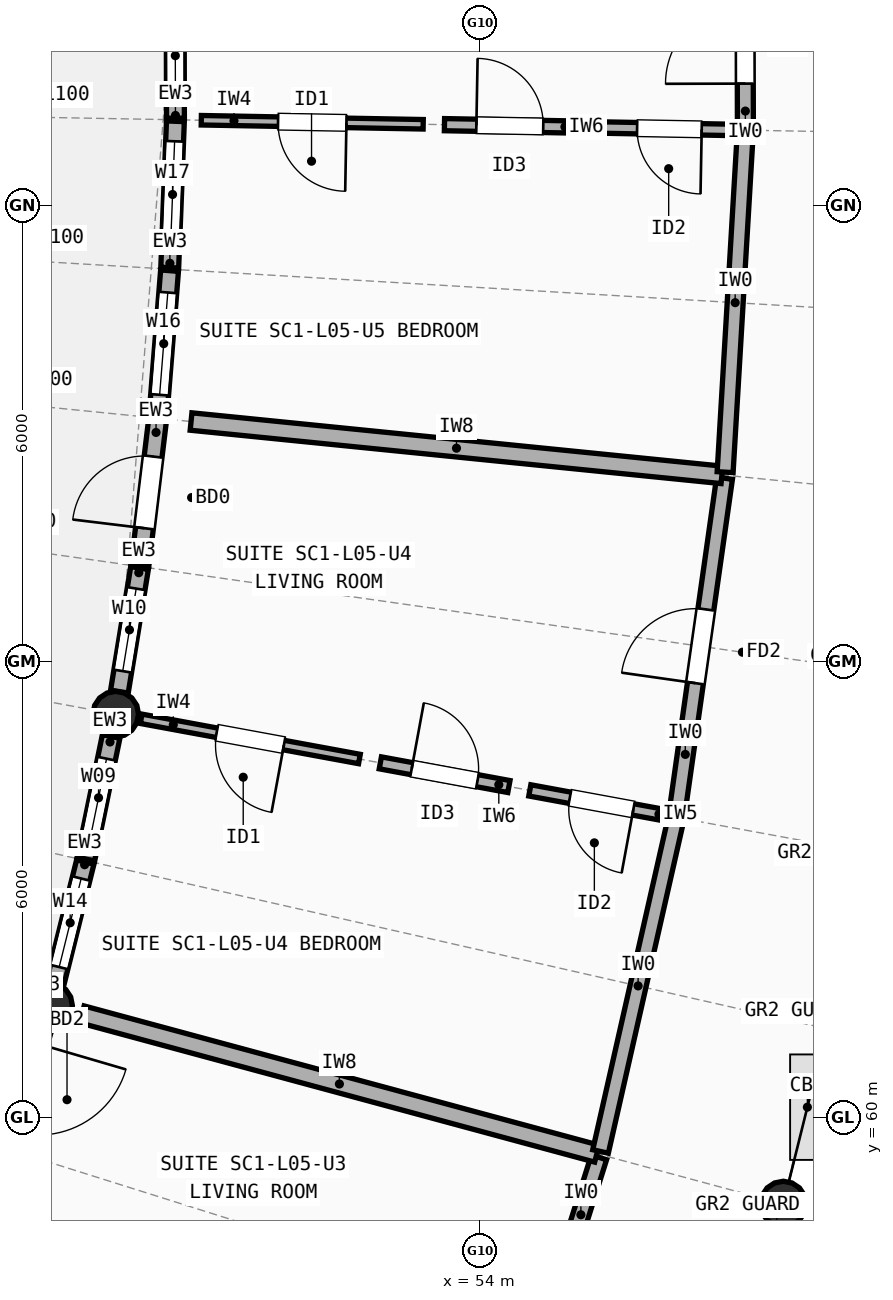
"""IFC4 building model, lengths in metres.
Left out: names, types, materials, properties, quantities, classifications, styles, units other than length and angle.
Written with IfcOpenShell. Run it as: python <this file> out.ifc"""

import sys

from ifc_helpers import new_model, si_unit, direction, frame, frame_2d, origin, origin_2d, place, context, subcontext, project, spatial, rectangle, circle, extrude, element, fill, save


model = new_model("IFC4")
c1 = context("Model", 3, precision=1e-05, world=origin(), true_north=direction((0.0, 1.0)))
c2 = subcontext(c1, "Body", "Model", "MODEL_VIEW")
j1 = project(units=[si_unit("LENGTHUNIT", "METRE"), si_unit("PLANEANGLEUNIT", "RADIAN")], contexts=[c1])
p1 = place(None, origin())
s1 = spatial("IfcSite", under=j1, at=p1, CompositionType="ELEMENT")
p2 = place(p1, origin())
s2 = spatial("IfcBuilding", under=s1, at=p2, CompositionType="ELEMENT")
p3 = place(p2, frame((0.0, 0.0, 17.3)))
s3 = spatial("IfcBuildingStorey", under=s2, at=p3, CompositionType="ELEMENT", Elevation=17.3)
for number, where, z_axis, x_axis in (
    (1, (48.336, 61.471, 0.0), (0.0, 0.0, 1.0), (1.0, 0.0, 0.0)),
    (2, (57.99, 58.861, 0.0), (0.0, 0.0, 1.0), (1.0, 0.0, 0.0)),
    (3, (49.206, 65.306, 0.0), (0.0, 0.0, 1.0), (1.0, 0.0, 0.0)),
):
    element("IfcColumn", number, at=place(p3, frame(where, z_axis=z_axis, x_axis=x_axis)), inside=s3, PredefinedType="COLUMN", context=c2, shape_type="SweptSolid", body=[
        extrude(circle(Radius=0.3, at=origin_2d()), origin(), (0.0, 0.0, 1.0), 2.94),
    ])
p4 = place(p3, frame((48.408, 61.762, 0.0), z_axis=(0.0, 0.0, 1.0), x_axis=(0.241175130643, 0.970481610521, 0.0)))
e4 = element("IfcWall", 4, at=p4, inside=s3, PredefinedType="STANDARD", context=c2, shape_type="SweptSolid", body=[
    extrude(rectangle(XDim=1.647, YDim=0.235, at=frame_2d((0.823, 0.0))), origin(), (0.0, 0.0, 1.0), 2.676),
])
p5 = place(p4, frame((0.223, 0.0, 0.85)))
e5 = element("IfcOpeningElement", 5, at=p5, cuts=e4, PredefinedType="OPENING", context=c2, shape_type="SweptSolid", body=[
    extrude(rectangle(XDim=1.2, YDim=1.5, at=frame_2d((0.6, 0.75))), frame((0.0, 0.127, 0.0), z_axis=(0.0, -1.0, 0.0), x_axis=(1.0, 0.0, 0.0)), (0.0, 0.0, 1.0), 0.255),
])
p6 = place(p3, frame((48.814, 63.399, 0.0), z_axis=(0.0, 0.0, 1.0), x_axis=(0.201188555682, 0.97955253308, 0.0)))
e6 = element("IfcWall", 6, at=p6, inside=s3, PredefinedType="STANDARD", context=c2, shape_type="SweptSolid", body=[
    extrude(rectangle(XDim=1.647, YDim=0.235, at=frame_2d((0.823, 0.0))), origin(), (0.0, 0.0, 1.0), 2.676),
])
p7 = place(p6, frame((0.298, 0.0, 0.85)))
e7 = element("IfcOpeningElement", 7, at=p7, cuts=e6, PredefinedType="OPENING", context=c2, shape_type="SweptSolid", body=[
    extrude(rectangle(XDim=1.05, YDim=1.35, at=frame_2d((0.525, 0.675))), frame((0.0, 0.127, 0.0), z_axis=(0.0, -1.0, 0.0), x_axis=(1.0, 0.0, 0.0)), (0.0, 0.0, 1.0), 0.255),
])
p8 = place(p3, frame((49.254, 65.603, 0.0), z_axis=(0.0, 0.0, 1.0), x_axis=(0.161008118798, 0.986953081803, 0.0)))
e8 = element("IfcWall", 8, at=p8, inside=s3, PredefinedType="STANDARD", context=c2, shape_type="SweptSolid", body=[
    extrude(rectangle(XDim=1.647, YDim=0.235, at=frame_2d((0.823, 0.0))), origin(), (0.0, 0.0, 1.0), 2.676),
])
p9 = place(p8, frame((0.273, 0.0, 0.85)))
e9 = element("IfcOpeningElement", 9, at=p9, cuts=e8, PredefinedType="OPENING", context=c2, shape_type="SweptSolid", body=[
    extrude(rectangle(XDim=1.1, YDim=1.45, at=frame_2d((0.55, 0.725))), frame((0.0, 0.127, 0.0), z_axis=(0.0, -1.0, 0.0), x_axis=(1.0, 0.0, 0.0)), (0.0, 0.0, 1.0), 0.255),
])
p10 = place(p3, frame((49.525, 67.268, 0.0), z_axis=(0.0, 0.0, 1.0), x_axis=(0.120384349076, 0.992727358592, 0.0)))
e10 = element("IfcWall", 10, at=p10, inside=s3, PredefinedType="STANDARD", context=c2, shape_type="SweptSolid", body=[
    extrude(rectangle(XDim=1.927, YDim=0.235, at=frame_2d((0.963, 0.0))), origin(), (0.0, 0.0, 1.0), 2.676),
])
p11 = place(p10, frame((0.488, 0.0, 0.0)))
e11 = element("IfcOpeningElement", 11, at=p11, cuts=e10, PredefinedType="OPENING", context=c2, shape_type="SweptSolid", body=[
    extrude(rectangle(XDim=0.95, YDim=2.12, at=frame_2d((0.475, 1.06))), frame((0.0, 0.127, 0.0), z_axis=(0.0, -1.0, 0.0), x_axis=(1.0, 0.0, 0.0)), (0.0, 0.0, 1.0), 0.255),
])
p12 = place(p3, frame((49.761, 69.22, 0.0), z_axis=(0.0, 0.0, 1.0), x_axis=(0.079573991137, 0.996828962227, 0.0)))
e12 = element("IfcWall", 12, at=p12, inside=s3, PredefinedType="STANDARD", context=c2, shape_type="SweptSolid", body=[
    extrude(rectangle(XDim=1.927, YDim=0.235, at=frame_2d((0.963, 0.0))), origin(), (0.0, 0.0, 1.0), 2.94),
])
p13 = place(p12, frame((0.289, 0.0, 0.85)))
e13 = element("IfcOpeningElement", 13, at=p13, cuts=e12, PredefinedType="OPENING", context=c2, shape_type="SweptSolid", body=[
    extrude(rectangle(XDim=1.35, YDim=1.5, at=frame_2d((0.675, 0.75))), frame((0.0, 0.127, 0.0), z_axis=(0.0, -1.0, 0.0), x_axis=(1.0, 0.0, 0.0)), (0.0, 0.0, 1.0), 0.255),
])
p14 = place(p3, frame((49.917, 71.181, 0.0), z_axis=(0.0, 0.0, 1.0), x_axis=(0.038647240614, 0.999252916329, 0.0)))
e14 = element("IfcWall", 14, at=p14, inside=s3, PredefinedType="STANDARD", context=c2, shape_type="SweptSolid", body=[
    extrude(rectangle(XDim=1.927, YDim=0.235, at=frame_2d((0.963, 0.0))), origin(), (0.0, 0.0, 1.0), 2.676),
])
p15 = place(p14, frame((0.263, 0.0, 0.85)))
e15 = element("IfcOpeningElement", 15, at=p15, cuts=e14, PredefinedType="OPENING", context=c2, shape_type="SweptSolid", body=[
    extrude(rectangle(XDim=1.4, YDim=1.5, at=frame_2d((0.7, 0.75))), frame((0.0, 0.127, 0.0), z_axis=(0.0, -1.0, 0.0), x_axis=(1.0, 0.0, 0.0)), (0.0, 0.0, 1.0), 0.255),
])
p16 = place(p3, frame((49.992, 73.146, 0.0), z_axis=(0.0, 0.0, 1.0), x_axis=(-0.002224193787, 0.999997526478, 0.0)))
e16 = element("IfcWall", 16, at=p16, inside=s3, PredefinedType="STANDARD", context=c2, shape_type="SweptSolid", body=[
    extrude(rectangle(XDim=1.646, YDim=0.235, at=frame_2d((0.823, 0.0))), origin(), (0.0, 0.0, 1.0), 2.676),
])
p17 = place(p16, frame((0.223, 0.0, 0.85)))
e17 = element("IfcOpeningElement", 17, at=p17, cuts=e16, PredefinedType="OPENING", context=c2, shape_type="SweptSolid", body=[
    extrude(rectangle(XDim=1.2, YDim=1.45, at=frame_2d((0.6, 0.725))), frame((0.0, 0.127, 0.0), z_axis=(0.0, -1.0, 0.0), x_axis=(1.0, 0.0, 0.0)), (0.0, 0.0, 1.0), 0.255),
])
p18 = place(p3, frame((54.222, 55.215, 0.0), z_axis=(0.0, 0.0, 1.0), x_axis=(0.300377958446, 0.953820256694, 0.0)))
e18 = element("IfcWall", 18, at=p18, inside=s3, PredefinedType="SOLIDWALL", context=c2, shape_type="SweptSolid", body=[
    extrude(rectangle(XDim=4.467, YDim=0.21, at=frame_2d((2.233, 0.0))), origin(), (0.0, 0.0, 1.0), 2.714),
])
p19 = place(p18, frame((1.733, 0.0, 0.0)))
e19 = element("IfcOpeningElement", 19, at=p19, cuts=e18, PredefinedType="OPENING", context=c2, shape_type="SweptSolid", body=[
    extrude(rectangle(XDim=1.0, YDim=2.15, at=frame_2d((0.5, 1.075))), frame((0.0, 0.115, 0.0), z_axis=(0.0, -1.0, 0.0), x_axis=(1.0, 0.0, 0.0)), (0.0, 0.0, 1.0), 0.23),
])
p20 = place(p3, frame((48.761, 61.356, 0.0), z_axis=(0.0, 0.0, 1.0), x_axis=(0.965329768393, -0.26103340448, 0.0)))
e20 = element("IfcWall", 20, at=p20, inside=s3, PredefinedType="SOLIDWALL", context=c2, shape_type="SweptSolid", body=[
    extrude(rectangle(XDim=7.02, YDim=0.23, at=frame_2d((3.51, 0.0))), origin(), (0.0, 0.0, 1.0), 2.734),
])
p21 = place(p3, frame((55.585, 59.552, 0.0), z_axis=(0.0, 0.0, 1.0), x_axis=(0.221221895428, 0.97522349899, 0.0)))
e21 = element("IfcWall", 21, at=p21, inside=s3, PredefinedType="SOLIDWALL", context=c2, shape_type="SweptSolid", body=[
    extrude(rectangle(XDim=4.467, YDim=0.21, at=frame_2d((2.234, 0.0))), origin(), (0.0, 0.0, 1.0), 2.754),
])
p22 = place(p3, frame((56.588, 63.988, 0.0), z_axis=(0.0, 0.0, 1.0), x_axis=(0.140732688284, 0.990047630394, 0.0)))
e22 = element("IfcWall", 22, at=p22, inside=s3, PredefinedType="SOLIDWALL", context=c2, shape_type="SweptSolid", body=[
    extrude(rectangle(XDim=4.467, YDim=0.21, at=frame_2d((2.233, 0.0))), origin(), (0.0, 0.0, 1.0), 2.734),
])
p23 = place(p22, frame((1.744, 0.0, 0.0)))
e23 = element("IfcOpeningElement", 23, at=p23, cuts=e22, PredefinedType="OPENING", context=c2, shape_type="SweptSolid", body=[
    extrude(rectangle(XDim=0.98, YDim=2.15, at=frame_2d((0.49, 1.075))), frame((0.0, 0.115, 0.0), z_axis=(0.0, -1.0, 0.0), x_axis=(1.0, 0.0, 0.0)), (0.0, 0.0, 1.0), 0.23),
])
p24 = place(p3, frame((49.541, 65.245, 0.0), z_axis=(0.0, 0.0, 1.0), x_axis=(0.983451228591, -0.181173069145, 0.0)))
e24 = element("IfcWall", 24, at=p24, inside=s3, PredefinedType="PARTITIONING", context=c2, shape_type="SweptSolid", body=[
    extrude(rectangle(XDim=2.92, YDim=0.125, at=frame_2d((1.46, 0.0))), origin(), (0.0, 0.0, 1.0), 2.714),
])
p25 = place(p24, frame((1.01, 0.0, 0.0)))
e25 = element("IfcOpeningElement", 25, at=p25, cuts=e24, PredefinedType="OPENING", context=c2, shape_type="SweptSolid", body=[
    extrude(rectangle(XDim=0.9, YDim=2.1, at=frame_2d((0.45, 1.05))), frame((0.0, 0.073, 0.0), z_axis=(0.0, -1.0, 0.0), x_axis=(1.0, 0.0, 0.0)), (0.0, 0.0, 1.0), 0.145),
])
p26 = place(p3, frame((52.688, 64.665, 0.0), z_axis=(0.0, 0.0, 1.0), x_axis=(0.983463169084, -0.181108241269, 0.0)))
e26 = element("IfcWall", 26, at=p26, inside=s3, PredefinedType="PLUMBINGWALL", context=c2, shape_type="SweptSolid", body=[
    extrude(rectangle(XDim=1.72, YDim=0.16, at=frame_2d((0.86, 0.0))), origin(), (0.0, 0.0, 1.0), 2.714),
])
p27 = place(p26, frame((0.42, 0.0, 0.0)))
e27 = element("IfcOpeningElement", 27, at=p27, cuts=e26, PredefinedType="OPENING", context=c2, shape_type="SweptSolid", body=[
    extrude(rectangle(XDim=0.88, YDim=2.1, at=frame_2d((0.44, 1.05))), frame((0.0, 0.09, 0.0), z_axis=(0.0, -1.0, 0.0), x_axis=(1.0, 0.0, 0.0)), (0.0, 0.0, 1.0), 0.18),
])
p28 = place(p3, frame((54.655, 64.303, 0.0), z_axis=(0.0, 0.0, 1.0), x_axis=(0.983468686283, -0.181078278933, 0.0)))
e28 = element("IfcWall", 28, at=p28, inside=s3, PredefinedType="PARTITIONING", context=c2, shape_type="SweptSolid", body=[
    extrude(rectangle(XDim=1.92, YDim=0.15, at=frame_2d((0.96, 0.0))), origin(), (0.0, 0.0, 1.0), 2.714),
])
p29 = place(p28, frame((0.535, 0.0, 0.0)))
e29 = element("IfcOpeningElement", 29, at=p29, cuts=e28, PredefinedType="OPENING", context=c2, shape_type="SweptSolid", body=[
    extrude(rectangle(XDim=0.85, YDim=2.1, at=frame_2d((0.425, 1.05))), frame((0.0, 0.085, 0.0), z_axis=(0.0, -1.0, 0.0), x_axis=(1.0, 0.0, 0.0)), (0.0, 0.0, 1.0), 0.17),
])
p30 = place(p3, frame((50.197, 69.156, 0.0), z_axis=(0.0, 0.0, 1.0), x_axis=(0.994988519083, -0.09998923389, 0.0)))
e30 = element("IfcWall", 30, at=p30, inside=s3, PredefinedType="SOLIDWALL", context=c2, shape_type="SweptSolid", body=[
    extrude(rectangle(XDim=7.02, YDim=0.23, at=frame_2d((3.51, 0.0))), origin(), (0.0, 0.0, 1.0), 2.754),
])
p31 = place(p3, frame((57.224, 68.49, 0.0), z_axis=(0.0, 0.0, 1.0), x_axis=(0.059132085895, 0.998250167252, 0.0)))
e31 = element("IfcWall", 31, at=p31, inside=s3, PredefinedType="SOLIDWALL", context=c2, shape_type="SweptSolid", body=[
    extrude(rectangle(XDim=4.467, YDim=0.21, at=frame_2d((2.234, 0.0))), origin(), (0.0, 0.0, 1.0), 2.714),
])
p32 = place(p3, frame((57.491, 73.029, 0.0), z_axis=(0.0, 0.0, 1.0), x_axis=(-0.0023367022, 0.999997269908, 0.0)))
e32 = element("IfcWall", 32, at=p32, inside=s3, PredefinedType="SOLIDWALL", context=c2, shape_type="SweptSolid", body=[
    extrude(rectangle(XDim=2.194, YDim=0.21, at=frame_2d((1.097, 0.0))), origin(), (0.0, 0.0, 1.0), 2.965),
])
p33 = place(p32, frame((0.572, 0.0, 0.0)))
e33 = element("IfcOpeningElement", 33, at=p33, cuts=e32, PredefinedType="OPENING", context=c2, shape_type="SweptSolid", body=[
    extrude(rectangle(XDim=1.05, YDim=2.15, at=frame_2d((0.525, 1.075))), frame((0.0, 0.115, 0.0), z_axis=(0.0, -1.0, 0.0), x_axis=(1.0, 0.0, 0.0)), (0.0, 0.0, 1.0), 0.23),
])
p34 = place(p3, frame((50.332, 73.12, 0.0), z_axis=(0.0, 0.0, 1.0), x_axis=(0.999833866331, -0.018227444628, 0.0)))
e34 = element("IfcWall", 34, at=p34, inside=s3, PredefinedType="PARTITIONING", context=c2, shape_type="SweptSolid", body=[
    extrude(rectangle(XDim=2.92, YDim=0.125, at=frame_2d((1.46, 0.0))), origin(), (0.0, 0.0, 1.0), 2.734),
])
p35 = place(p34, frame((1.01, 0.0, 0.0)))
e35 = element("IfcOpeningElement", 35, at=p35, cuts=e34, PredefinedType="OPENING", context=c2, shape_type="SweptSolid", body=[
    extrude(rectangle(XDim=0.9, YDim=2.1, at=frame_2d((0.45, 1.05))), frame((0.0, 0.073, 0.0), z_axis=(0.0, -1.0, 0.0), x_axis=(1.0, 0.0, 0.0)), (0.0, 0.0, 1.0), 0.145),
])
p36 = place(p3, frame((53.531, 73.062, 0.0), z_axis=(0.0, 0.0, 1.0), x_axis=(0.999832350792, -0.018310388026, 0.0)))
e36 = element("IfcWall", 36, at=p36, inside=s3, PredefinedType="PLUMBINGWALL", context=c2, shape_type="SweptSolid", body=[
    extrude(rectangle(XDim=1.72, YDim=0.16, at=frame_2d((0.86, 0.0))), origin(), (0.0, 0.0, 1.0), 2.734),
])
p37 = place(p36, frame((0.42, 0.0, 0.0)))
e37 = element("IfcOpeningElement", 37, at=p37, cuts=e36, PredefinedType="OPENING", context=c2, shape_type="SweptSolid", body=[
    extrude(rectangle(XDim=0.88, YDim=2.1, at=frame_2d((0.44, 1.05))), frame((0.0, 0.09, 0.0), z_axis=(0.0, -1.0, 0.0), x_axis=(1.0, 0.0, 0.0)), (0.0, 0.0, 1.0), 0.18),
])
p38 = place(p3, frame((55.531, 73.025, 0.0), z_axis=(0.0, 0.0, 1.0), x_axis=(0.99983466766, -0.018183436026, 0.0)))
e38 = element("IfcWall", 38, at=p38, inside=s3, PredefinedType="PARTITIONING", context=c2, shape_type="SweptSolid", body=[
    extrude(rectangle(XDim=1.92, YDim=0.15, at=frame_2d((0.96, 0.0))), origin(), (0.0, 0.0, 1.0), 2.734),
])
p39 = place(p38, frame((0.535, 0.0, 0.0)))
e39 = element("IfcOpeningElement", 39, at=p39, cuts=e38, PredefinedType="OPENING", context=c2, shape_type="SweptSolid", body=[
    extrude(rectangle(XDim=0.85, YDim=2.1, at=frame_2d((0.425, 1.05))), frame((0.0, 0.085, 0.0), z_axis=(0.0, -1.0, 0.0), x_axis=(1.0, 0.0, 0.0)), (0.0, 0.0, 1.0), 0.17),
])
p40 = place(p5, origin())
e40 = element("IfcWindow", 40, at=p40, inside=s3, PartitioningType="SINGLE_PANEL", PredefinedType="WINDOW", context=c2, shape_type="SweptSolid", body=[
    extrude(rectangle(XDim=1.2, YDim=1.5, at=frame_2d((0.6, 0.75))), frame((0.0, 0.03, 0.0), z_axis=(0.0, -1.0, 0.0), x_axis=(1.0, 0.0, 0.0)), (0.0, 0.0, 1.0), 0.06),
])
fill(e5, e40)
p41 = place(p7, origin())
e41 = element("IfcWindow", 41, at=p41, inside=s3, PartitioningType="SINGLE_PANEL", PredefinedType="WINDOW", context=c2, shape_type="SweptSolid", body=[
    extrude(rectangle(XDim=1.05, YDim=1.35, at=frame_2d((0.525, 0.675))), frame((0.0, 0.03, 0.0), z_axis=(0.0, -1.0, 0.0), x_axis=(1.0, 0.0, 0.0)), (0.0, 0.0, 1.0), 0.06),
])
fill(e7, e41)
p42 = place(p9, origin())
e42 = element("IfcWindow", 42, at=p42, inside=s3, PartitioningType="SINGLE_PANEL", PredefinedType="WINDOW", context=c2, shape_type="SweptSolid", body=[
    extrude(rectangle(XDim=1.1, YDim=1.45, at=frame_2d((0.55, 0.725))), frame((0.0, 0.03, 0.0), z_axis=(0.0, -1.0, 0.0), x_axis=(1.0, 0.0, 0.0)), (0.0, 0.0, 1.0), 0.06),
])
fill(e9, e42)
p43 = place(p11, origin())
e43 = element("IfcDoor", 43, at=p43, inside=s3, OperationType="SINGLE_SWING_LEFT", PredefinedType="DOOR", context=c2, shape_type="SweptSolid", body=[
    extrude(rectangle(XDim=0.95, YDim=2.12, at=frame_2d((0.475, 1.06))), frame((0.0, 0.025, 0.0), z_axis=(0.0, -1.0, 0.0), x_axis=(1.0, 0.0, 0.0)), (0.0, 0.0, 1.0), 0.05),
])
fill(e11, e43)
p44 = place(p13, origin())
e44 = element("IfcWindow", 44, at=p44, inside=s3, PartitioningType="SINGLE_PANEL", PredefinedType="WINDOW", context=c2, shape_type="SweptSolid", body=[
    extrude(rectangle(XDim=1.35, YDim=1.5, at=frame_2d((0.675, 0.75))), frame((0.0, 0.03, 0.0), z_axis=(0.0, -1.0, 0.0), x_axis=(1.0, 0.0, 0.0)), (0.0, 0.0, 1.0), 0.06),
])
fill(e13, e44)
p45 = place(p15, origin())
e45 = element("IfcWindow", 45, at=p45, inside=s3, PartitioningType="SINGLE_PANEL", PredefinedType="WINDOW", context=c2, shape_type="SweptSolid", body=[
    extrude(rectangle(XDim=1.4, YDim=1.5, at=frame_2d((0.7, 0.75))), frame((0.0, 0.03, 0.0), z_axis=(0.0, -1.0, 0.0), x_axis=(1.0, 0.0, 0.0)), (0.0, 0.0, 1.0), 0.06),
])
fill(e15, e45)
p46 = place(p17, origin())
e46 = element("IfcWindow", 46, at=p46, inside=s3, PartitioningType="SINGLE_PANEL", PredefinedType="WINDOW", context=c2, shape_type="SweptSolid", body=[
    extrude(rectangle(XDim=1.2, YDim=1.45, at=frame_2d((0.6, 0.725))), frame((0.0, 0.03, 0.0), z_axis=(0.0, -1.0, 0.0), x_axis=(1.0, 0.0, 0.0)), (0.0, 0.0, 1.0), 0.06),
])
fill(e17, e46)
p47 = place(p23, origin())
e47 = element("IfcDoor", 47, at=p47, inside=s3, OperationType="SINGLE_SWING_LEFT", PredefinedType="DOOR", context=c2, shape_type="SweptSolid", body=[
    extrude(rectangle(XDim=0.98, YDim=2.15, at=frame_2d((0.49, 1.075))), frame((0.0, 0.025, 0.0), z_axis=(0.0, -1.0, 0.0), x_axis=(1.0, 0.0, 0.0)), (0.0, 0.0, 1.0), 0.05),
])
fill(e23, e47)
p48 = place(p25, origin())
e48 = element("IfcDoor", 48, at=p48, inside=s3, OperationType="SINGLE_SWING_RIGHT", PredefinedType="DOOR", context=c2, shape_type="SweptSolid", body=[
    extrude(rectangle(XDim=0.9, YDim=2.1, at=frame_2d((0.45, 1.05))), frame((0.0, 0.025, 0.0), z_axis=(0.0, -1.0, 0.0), x_axis=(1.0, 0.0, 0.0)), (0.0, 0.0, 1.0), 0.05),
])
fill(e25, e48)
p49 = place(p27, origin())
e49 = element("IfcDoor", 49, at=p49, inside=s3, OperationType="SINGLE_SWING_LEFT", PredefinedType="DOOR", context=c2, shape_type="SweptSolid", body=[
    extrude(rectangle(XDim=0.88, YDim=2.1, at=frame_2d((0.44, 1.05))), frame((0.0, 0.025, 0.0), z_axis=(0.0, -1.0, 0.0), x_axis=(1.0, 0.0, 0.0)), (0.0, 0.0, 1.0), 0.05),
])
fill(e27, e49)
p50 = place(p29, origin())
e50 = element("IfcDoor", 50, at=p50, inside=s3, OperationType="SINGLE_SWING_RIGHT", PredefinedType="DOOR", context=c2, shape_type="SweptSolid", body=[
    extrude(rectangle(XDim=0.85, YDim=2.1, at=frame_2d((0.425, 1.05))), frame((0.0, 0.025, 0.0), z_axis=(0.0, -1.0, 0.0), x_axis=(1.0, 0.0, 0.0)), (0.0, 0.0, 1.0), 0.05),
])
fill(e29, e50)
p51 = place(p33, origin())
e51 = element("IfcDoor", 51, at=p51, inside=s3, OperationType="SINGLE_SWING_LEFT", PredefinedType="DOOR", context=c2, shape_type="SweptSolid", body=[
    extrude(rectangle(XDim=1.05, YDim=2.15, at=frame_2d((0.525, 1.075))), frame((0.0, 0.025, 0.0), z_axis=(0.0, -1.0, 0.0), x_axis=(1.0, 0.0, 0.0)), (0.0, 0.0, 1.0), 0.05),
])
fill(e33, e51)
p52 = place(p35, origin())
e52 = element("IfcDoor", 52, at=p52, inside=s3, OperationType="SINGLE_SWING_RIGHT", PredefinedType="DOOR", context=c2, shape_type="SweptSolid", body=[
    extrude(rectangle(XDim=0.9, YDim=2.1, at=frame_2d((0.45, 1.05))), frame((0.0, 0.025, 0.0), z_axis=(0.0, -1.0, 0.0), x_axis=(1.0, 0.0, 0.0)), (0.0, 0.0, 1.0), 0.05),
])
fill(e35, e52)
p53 = place(p37, origin())
e53 = element("IfcDoor", 53, at=p53, inside=s3, OperationType="SINGLE_SWING_LEFT", PredefinedType="DOOR", context=c2, shape_type="SweptSolid", body=[
    extrude(rectangle(XDim=0.88, YDim=2.1, at=frame_2d((0.44, 1.05))), frame((0.0, 0.025, 0.0), z_axis=(0.0, -1.0, 0.0), x_axis=(1.0, 0.0, 0.0)), (0.0, 0.0, 1.0), 0.05),
])
fill(e37, e53)
p54 = place(p39, origin())
e54 = element("IfcDoor", 54, at=p54, inside=s3, OperationType="SINGLE_SWING_RIGHT", PredefinedType="DOOR", context=c2, shape_type="SweptSolid", body=[
    extrude(rectangle(XDim=0.85, YDim=2.1, at=frame_2d((0.425, 1.05))), frame((0.0, 0.025, 0.0), z_axis=(0.0, -1.0, 0.0), x_axis=(1.0, 0.0, 0.0)), (0.0, 0.0, 1.0), 0.05),
])
fill(e39, e54)
save(model, sys.argv[1])
